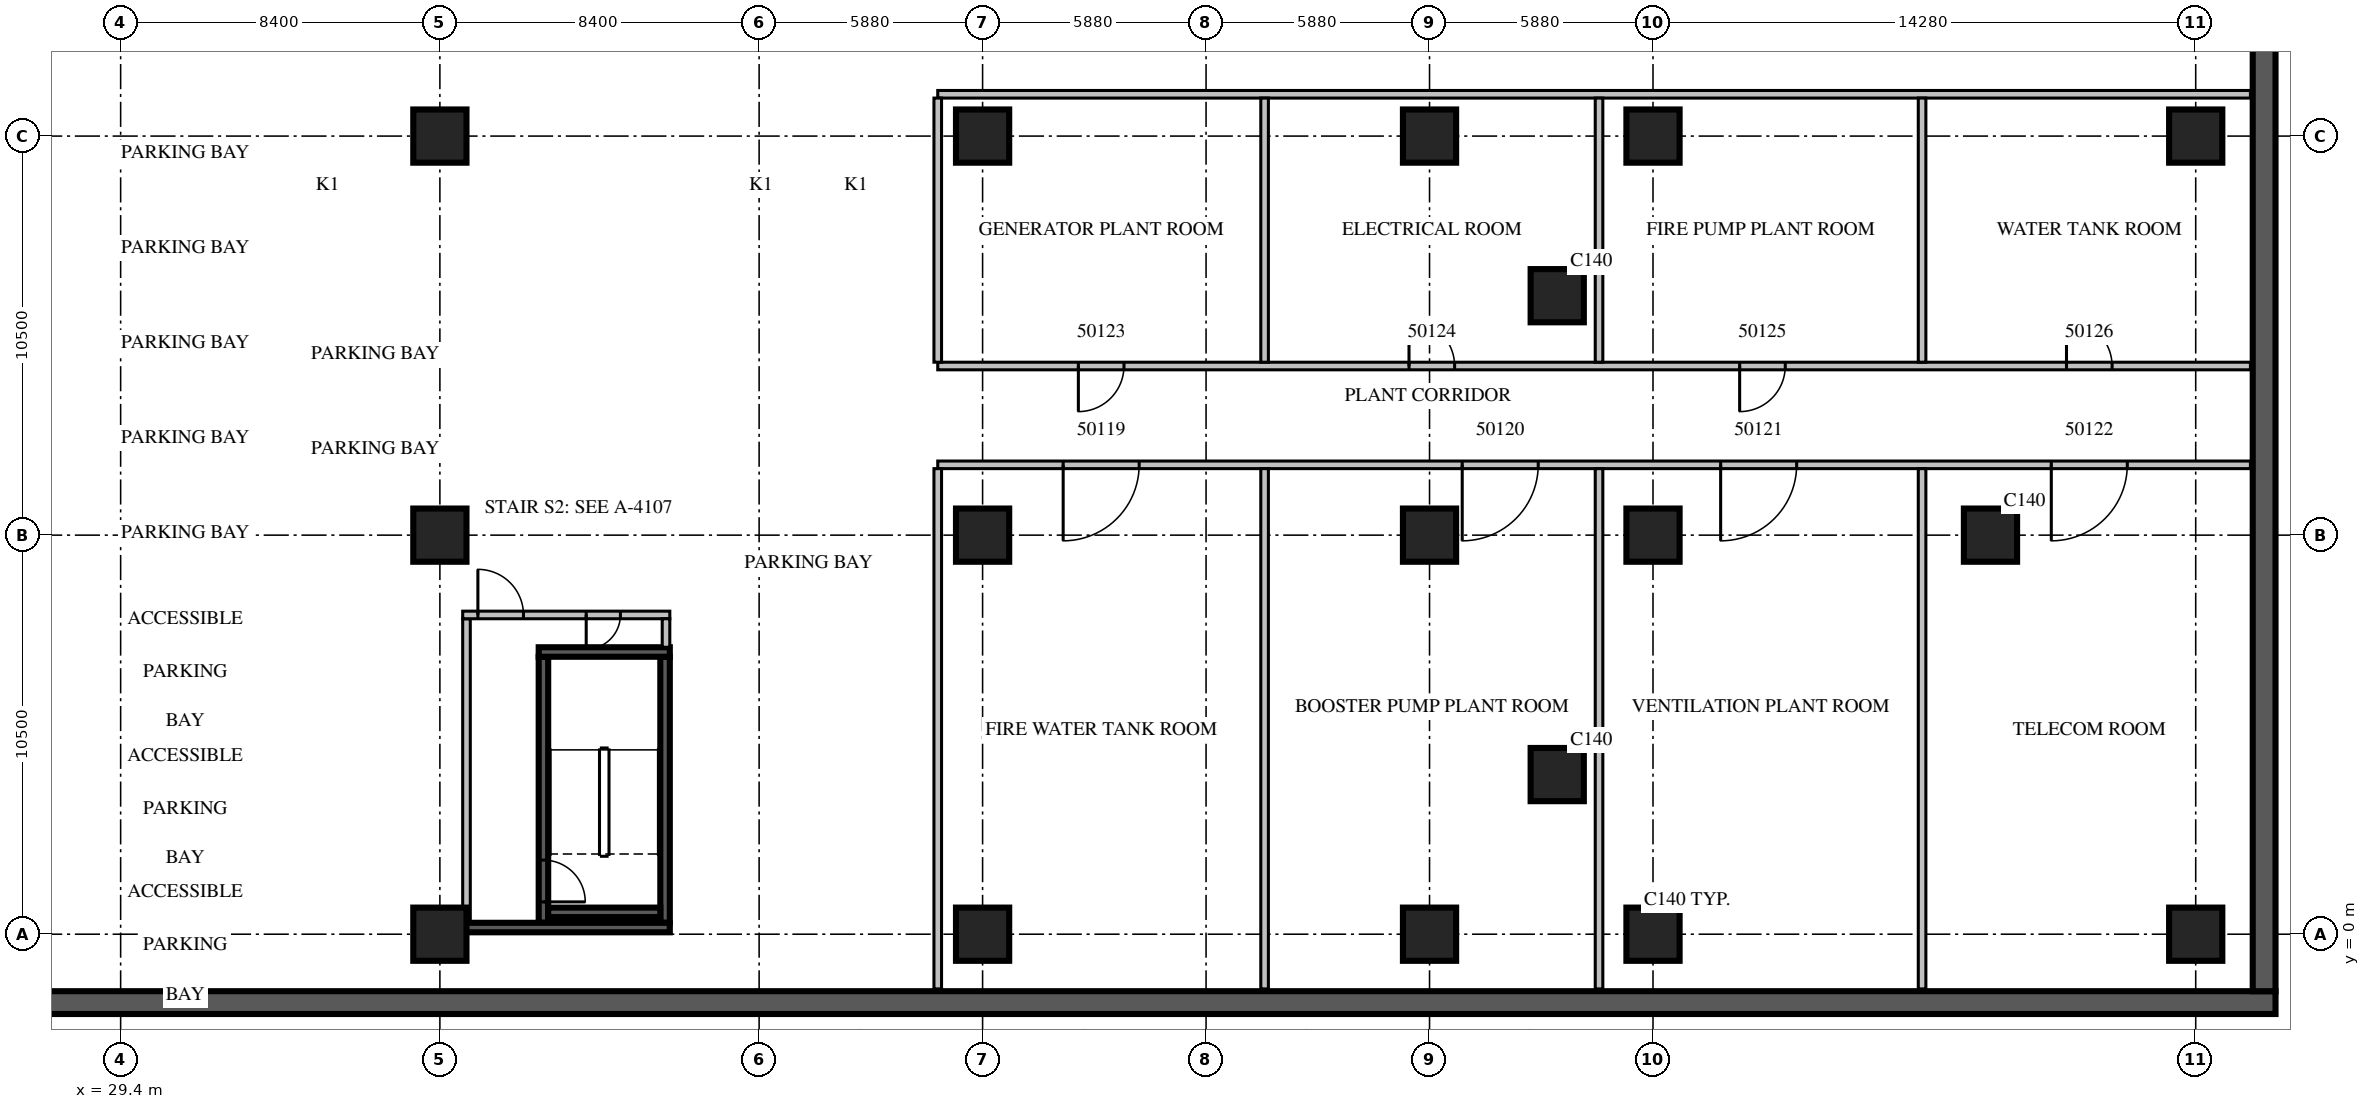
"""IFC4 building model, lengths in metres.
Left out: names, types, materials, properties, quantities, classifications, styles, units other than length and angle.
Written with IfcOpenShell. Run it as: python <this file> out.ifc"""

import sys

from ifc_helpers import new_model, si_unit, direction, frame, frame_2d, origin, origin_2d, place, context, subcontext, project, spatial, rectangle, extrude, source, transform, mapped, element, fill, save


model = new_model("IFC4")
c1 = context("Model", 3, precision=1e-05, world=origin(), true_north=direction((0.0, 1.0)))
c2 = subcontext(c1, "Body", "Model", "MODEL_VIEW")
j1 = project(units=[si_unit("LENGTHUNIT", "METRE"), si_unit("PLANEANGLEUNIT", "RADIAN")], contexts=[c1])
p1 = place(None, origin())
s1 = spatial("IfcSite", under=j1, at=p1, CompositionType="ELEMENT")
p2 = place(p1, origin())
s2 = spatial("IfcBuilding", under=s1, at=p2, CompositionType="ELEMENT")
p3 = place(p2, frame((0.0, 0.0, -9.0)))
s3 = spatial("IfcBuildingStorey", under=s2, at=p3, CompositionType="ELEMENT", Elevation=-9.0)
m1 = source(origin(), c2, "Body", "SweptSolid", [
    extrude(rectangle(XDim=87.6, YDim=0.6, at=frame_2d((43.8, 0.0))), origin(), (0.0, 0.0, 1.0), 4.5),
])
p4 = place(p3, frame((-1.5, -1.8, 0.0), z_axis=(0.0, 0.0, 1.0), x_axis=(1.0, 0.0, 0.0)))
e1 = element("IfcWall", 1, at=p4, inside=s3, PredefinedType="SOLIDWALL", context=c2, shape_type="MappedRepresentation", body=[
    mapped(m1, transform((0.0, 0.0, 0.0), scale=1.0)),
])
m2 = source(origin(), c2, "Body", "SweptSolid", [
    extrude(rectangle(XDim=55.68, YDim=0.6, at=frame_2d((27.84, 0.0))), origin(), (0.0, 0.0, 1.0), 4.5),
])
p5 = place(p3, frame((85.8, -1.5, 0.0), z_axis=(0.0, 0.0, 1.0), x_axis=(0.0, 1.0, 0.0)))
e2 = element("IfcWall", 2, at=p5, inside=s3, PredefinedType="SOLIDWALL", context=c2, shape_type="MappedRepresentation", body=[
    mapped(m2, transform((0.0, 0.0, 0.0), scale=1.0)),
])
m3 = source(origin(), c2, "Body", "SweptSolid", [
    extrude(rectangle(XDim=1.4, YDim=1.4, at=origin_2d()), origin(), (0.0, 0.0, 1.0), 4.5),
])
for number, where, z_axis, x_axis in (
    (3, (37.8, 0.0, 0.0), (0.0, 0.0, 1.0), (1.0, 0.0, 0.0)),
    (4, (37.8, 10.5, 0.0), (0.0, 0.0, 1.0), (1.0, 0.0, 0.0)),
    (5, (37.8, 21.0, 0.0), (0.0, 0.0, 1.0), (1.0, 0.0, 0.0)),
    (6, (52.08, 0.0, 0.0), (0.0, 0.0, 1.0), (1.0, 0.0, 0.0)),
    (7, (52.08, 10.5, 0.0), (0.0, 0.0, 1.0), (1.0, 0.0, 0.0)),
    (8, (52.08, 21.0, 0.0), (0.0, 0.0, 1.0), (1.0, 0.0, 0.0)),
    (9, (63.84, 0.0, 0.0), (0.0, 0.0, 1.0), (1.0, 0.0, 0.0)),
    (10, (63.84, 10.5, 0.0), (0.0, 0.0, 1.0), (1.0, 0.0, 0.0)),
    (11, (63.84, 21.0, 0.0), (0.0, 0.0, 1.0), (1.0, 0.0, 0.0)),
    (12, (67.2, 4.2, 0.0), (0.0, 0.0, 1.0), (1.0, 0.0, 0.0)),
    (13, (67.2, 16.8, 0.0), (0.0, 0.0, 1.0), (1.0, 0.0, 0.0)),
    (14, (69.72, 0.0, 0.0), (0.0, 0.0, 1.0), (1.0, 0.0, 0.0)),
    (15, (69.72, 10.5, 0.0), (0.0, 0.0, 1.0), (1.0, 0.0, 0.0)),
    (16, (69.72, 21.0, 0.0), (0.0, 0.0, 1.0), (1.0, 0.0, 0.0)),
    (17, (78.6, 10.5, 0.0), (0.0, 0.0, 1.0), (1.0, 0.0, 0.0)),
    (18, (84.0, 0.0, 0.0), (0.0, 0.0, 1.0), (1.0, 0.0, 0.0)),
    (19, (84.0, 21.0, 0.0), (0.0, 0.0, 1.0), (1.0, 0.0, 0.0)),
):
    element("IfcColumn", number, at=place(p3, frame(where, z_axis=z_axis, x_axis=x_axis)), inside=s3, PredefinedType="COLUMN", context=c2, shape_type="MappedRepresentation", body=[
        mapped(m3, transform((0.0, 0.0, 0.0), scale=1.0)),
    ])
m4 = source(origin(), c2, "Body", "SweptSolid", [
    extrude(rectangle(XDim=7.0, YDim=0.25, at=frame_2d((3.5, 0.0))), origin(), (0.0, 0.0, 1.0), 3.9),
])
p6 = place(p3, frame((40.525, 0.3, 0.0), z_axis=(0.0, 0.0, 1.0), x_axis=(0.0, 1.0, 0.0)))
e20 = element("IfcWall", 20, at=p6, inside=s3, PredefinedType="SOLIDWALL", context=c2, shape_type="MappedRepresentation", body=[
    mapped(m4, transform((0.0, 0.0, 0.0), scale=1.0)),
])
m5 = source(origin(), c2, "Body", "SweptSolid", [
    extrude(rectangle(XDim=1.1, YDim=2.1, at=frame_2d((0.55, 1.05))), frame((0.0, 0.135, 0.0), z_axis=(0.0, -1.0, 0.0), x_axis=(1.0, 0.0, 0.0)), (0.0, 0.0, 1.0), 0.27),
])
p7 = place(p6, frame((0.55, 0.0, 0.0)))
e21 = element("IfcOpeningElement", 21, at=p7, cuts=e20, PredefinedType="OPENING", context=c2, shape_type="MappedRepresentation", body=[
    mapped(m5, transform((0.0, 0.0, 0.0), scale=1.0)),
])
p8 = place(p3, frame((43.725, 0.3, 0.0), z_axis=(0.0, 0.0, 1.0), x_axis=(0.0, 1.0, 0.0)))
e22 = element("IfcWall", 22, at=p8, inside=s3, PredefinedType="SOLIDWALL", context=c2, shape_type="MappedRepresentation", body=[
    mapped(m4, transform((0.0, 0.0, 0.0), scale=1.0)),
])
m6 = source(origin(), c2, "Body", "SweptSolid", [
    extrude(rectangle(XDim=3.45, YDim=0.25, at=frame_2d((1.725, 0.0))), origin(), (0.0, 0.0, 1.0), 3.9),
])
p9 = place(p3, frame((40.4, 7.425, 0.0), z_axis=(0.0, 0.0, 1.0), x_axis=(1.0, 0.0, 0.0)))
e23 = element("IfcWall", 23, at=p9, inside=s3, PredefinedType="SOLIDWALL", context=c2, shape_type="MappedRepresentation", body=[
    mapped(m6, transform((0.0, 0.0, 0.0), scale=1.0)),
])
m7 = source(origin(), c2, "Body", "SweptSolid", [
    extrude(rectangle(XDim=2.95, YDim=0.25, at=frame_2d((1.475, 0.0))), origin(), (0.0, 0.0, 1.0), 3.9),
])
p10 = place(p3, frame((40.65, 0.575, 0.0), z_axis=(0.0, 0.0, 1.0), x_axis=(1.0, 0.0, 0.0)))
e24 = element("IfcWall", 24, at=p10, inside=s3, PredefinedType="SOLIDWALL", context=c2, shape_type="MappedRepresentation", body=[
    mapped(m7, transform((0.0, 0.0, 0.0), scale=1.0)),
])
m8 = source(origin(), c2, "Body", "SweptSolid", [
    extrude(rectangle(XDim=8.0, YDim=0.2, at=frame_2d((4.0, 0.0))), origin(), (0.0, 0.0, 1.0), 3.9),
])
p11 = place(p3, frame((38.5, 0.3, 0.0), z_axis=(0.0, 0.0, 1.0), x_axis=(0.0, 1.0, 0.0)))
e25 = element("IfcWall", 25, at=p11, inside=s3, PredefinedType="PARTITIONING", context=c2, shape_type="MappedRepresentation", body=[
    mapped(m8, transform((0.0, 0.0, 0.0), scale=1.0)),
])
m9 = source(origin(), c2, "Body", "SweptSolid", [
    extrude(rectangle(XDim=5.45, YDim=0.2, at=frame_2d((2.725, 0.0))), origin(), (0.0, 0.0, 1.0), 3.9),
])
p12 = place(p3, frame((38.4, 8.4, 0.0), z_axis=(0.0, 0.0, 1.0), x_axis=(1.0, 0.0, 0.0)))
e26 = element("IfcWall", 26, at=p12, inside=s3, PredefinedType="PARTITIONING", context=c2, shape_type="MappedRepresentation", body=[
    mapped(m9, transform((0.0, 0.0, 0.0), scale=1.0)),
])
m10 = source(origin(), c2, "Body", "SweptSolid", [
    extrude(rectangle(XDim=1.2, YDim=2.1, at=frame_2d((0.6, 1.05))), frame((0.0, 0.11, 0.0), z_axis=(0.0, -1.0, 0.0), x_axis=(1.0, 0.0, 0.0)), (0.0, 0.0, 1.0), 0.22),
])
p13 = place(p12, frame((0.4, 0.0, 0.0)))
e27 = element("IfcOpeningElement", 27, at=p13, cuts=e26, PredefinedType="OPENING", context=c2, shape_type="MappedRepresentation", body=[
    mapped(m10, transform((0.0, 0.0, 0.0), scale=1.0)),
])
m11 = source(origin(), c2, "Body", "SweptSolid", [
    extrude(rectangle(XDim=0.9, YDim=2.1, at=frame_2d((0.45, 1.05))), frame((0.0, 0.11, 0.0), z_axis=(0.0, -1.0, 0.0), x_axis=(1.0, 0.0, 0.0)), (0.0, 0.0, 1.0), 0.22),
])
p14 = place(p12, frame((3.25, 0.0, 0.0)))
e28 = element("IfcOpeningElement", 28, at=p14, cuts=e26, PredefinedType="OPENING", context=c2, shape_type="MappedRepresentation", body=[
    mapped(m11, transform((0.0, 0.0, 0.0), scale=1.0)),
])
m12 = source(origin(), c2, "Body", "SweptSolid", [
    extrude(rectangle(XDim=0.75, YDim=0.2, at=frame_2d((0.375, 0.0))), origin(), (0.0, 0.0, 1.0), 3.9),
])
p15 = place(p3, frame((43.75, 7.55, 0.0), z_axis=(0.0, 0.0, 1.0), x_axis=(0.0, 1.0, 0.0)))
e29 = element("IfcWall", 29, at=p15, inside=s3, PredefinedType="PARTITIONING", context=c2, shape_type="MappedRepresentation", body=[
    mapped(m12, transform((0.0, 0.0, 0.0), scale=1.0)),
])
m13 = source(origin(), c2, "Body", "SweptSolid", [
    extrude(rectangle(XDim=5.45, YDim=0.25, at=frame_2d((2.725, 0.0))), origin(), (0.0, 0.0, 1.0), 3.9),
])
p16 = place(p3, frame((38.4, 0.175, 0.0), z_axis=(0.0, 0.0, 1.0), x_axis=(1.0, 0.0, 0.0)))
e30 = element("IfcWall", 30, at=p16, inside=s3, PredefinedType="SOLIDWALL", context=c2, shape_type="MappedRepresentation", body=[
    mapped(m13, transform((0.0, 0.0, 0.0), scale=1.0)),
])
m14 = source(origin(), c2, "Body", "SweptSolid", [
    extrude(rectangle(XDim=34.54, YDim=0.2, at=frame_2d((17.27, 0.0))), origin(), (0.0, 0.0, 1.0), 3.9),
])
p17 = place(p3, frame((50.9, 12.35, 0.0), z_axis=(0.0, 0.0, 1.0), x_axis=(1.0, 0.0, 0.0)))
e31 = element("IfcWall", 31, at=p17, inside=s3, PredefinedType="PARTITIONING", context=c2, shape_type="MappedRepresentation", body=[
    mapped(m14, transform((0.0, 0.0, 0.0), scale=1.0)),
])
m15 = source(origin(), c2, "Body", "SweptSolid", [
    extrude(rectangle(XDim=2.0, YDim=2.1, at=frame_2d((1.0, 1.05))), frame((0.0, 0.11, 0.0), z_axis=(0.0, -1.0, 0.0), x_axis=(1.0, 0.0, 0.0)), (0.0, 0.0, 1.0), 0.22),
])
p18 = place(p17, frame((3.3, 0.0, 0.0)))
e32 = element("IfcOpeningElement", 32, at=p18, cuts=e31, PredefinedType="OPENING", context=c2, shape_type="MappedRepresentation", body=[
    mapped(m15, transform((0.0, 0.0, 0.0), scale=1.0)),
])
p19 = place(p17, frame((13.8, 0.0, 0.0)))
e33 = element("IfcOpeningElement", 33, at=p19, cuts=e31, PredefinedType="OPENING", context=c2, shape_type="MappedRepresentation", body=[
    mapped(m15, transform((0.0, 0.0, 0.0), scale=1.0)),
])
p20 = place(p17, frame((20.6, 0.0, 0.0)))
e34 = element("IfcOpeningElement", 34, at=p20, cuts=e31, PredefinedType="OPENING", context=c2, shape_type="MappedRepresentation", body=[
    mapped(m15, transform((0.0, 0.0, 0.0), scale=1.0)),
])
p21 = place(p17, frame((29.3, 0.0, 0.0)))
e35 = element("IfcOpeningElement", 35, at=p21, cuts=e31, PredefinedType="OPENING", context=c2, shape_type="MappedRepresentation", body=[
    mapped(m15, transform((0.0, 0.0, 0.0), scale=1.0)),
])
p22 = place(p3, frame((50.9, 14.95, 0.0), z_axis=(0.0, 0.0, 1.0), x_axis=(1.0, 0.0, 0.0)))
e36 = element("IfcWall", 36, at=p22, inside=s3, PredefinedType="PARTITIONING", context=c2, shape_type="MappedRepresentation", body=[
    mapped(m14, transform((0.0, 0.0, 0.0), scale=1.0)),
])
p23 = place(p22, frame((3.7, 0.0, 0.0)))
e37 = element("IfcOpeningElement", 37, at=p23, cuts=e36, PredefinedType="OPENING", context=c2, shape_type="MappedRepresentation", body=[
    mapped(m10, transform((0.0, 0.0, 0.0), scale=1.0)),
])
p24 = place(p22, frame((12.4, 0.0, 0.0)))
e38 = element("IfcOpeningElement", 38, at=p24, cuts=e36, PredefinedType="OPENING", context=c2, shape_type="MappedRepresentation", body=[
    mapped(m10, transform((0.0, 0.0, 0.0), scale=1.0)),
])
p25 = place(p22, frame((21.1, 0.0, 0.0)))
e39 = element("IfcOpeningElement", 39, at=p25, cuts=e36, PredefinedType="OPENING", context=c2, shape_type="MappedRepresentation", body=[
    mapped(m10, transform((0.0, 0.0, 0.0), scale=1.0)),
])
p26 = place(p22, frame((29.7, 0.0, 0.0)))
e40 = element("IfcOpeningElement", 40, at=p26, cuts=e36, PredefinedType="OPENING", context=c2, shape_type="MappedRepresentation", body=[
    mapped(m10, transform((0.0, 0.0, 0.0), scale=1.0)),
])
p27 = place(p3, frame((50.9, 22.1, 0.0), z_axis=(0.0, 0.0, 1.0), x_axis=(1.0, 0.0, 0.0)))
e41 = element("IfcWall", 41, at=p27, inside=s3, PredefinedType="PARTITIONING", context=c2, shape_type="MappedRepresentation", body=[
    mapped(m14, transform((0.0, 0.0, 0.0), scale=1.0)),
])
m16 = source(origin(), c2, "Body", "SweptSolid", [
    extrude(rectangle(XDim=13.69, YDim=0.2, at=frame_2d((6.845, 0.0))), origin(), (0.0, 0.0, 1.0), 3.9),
])
p28 = place(p3, frame((50.9, -1.44, 0.0), z_axis=(0.0, 0.0, 1.0), x_axis=(0.0, 1.0, 0.0)))
e42 = element("IfcWall", 42, at=p28, inside=s3, PredefinedType="PARTITIONING", context=c2, shape_type="MappedRepresentation", body=[
    mapped(m16, transform((0.0, 0.0, 0.0), scale=1.0)),
])
m17 = source(origin(), c2, "Body", "SweptSolid", [
    extrude(rectangle(XDim=6.95, YDim=0.2, at=frame_2d((3.475, 0.0))), origin(), (0.0, 0.0, 1.0), 3.9),
])
p29 = place(p3, frame((50.9, 15.05, 0.0), z_axis=(0.0, 0.0, 1.0), x_axis=(0.0, 1.0, 0.0)))
e43 = element("IfcWall", 43, at=p29, inside=s3, PredefinedType="PARTITIONING", context=c2, shape_type="MappedRepresentation", body=[
    mapped(m17, transform((0.0, 0.0, 0.0), scale=1.0)),
])
p30 = place(p3, frame((59.5, -1.44, 0.0), z_axis=(0.0, 0.0, 1.0), x_axis=(0.0, 1.0, 0.0)))
e44 = element("IfcWall", 44, at=p30, inside=s3, PredefinedType="PARTITIONING", context=c2, shape_type="MappedRepresentation", body=[
    mapped(m16, transform((0.0, 0.0, 0.0), scale=1.0)),
])
p31 = place(p3, frame((59.5, 15.05, 0.0), z_axis=(0.0, 0.0, 1.0), x_axis=(0.0, 1.0, 0.0)))
e45 = element("IfcWall", 45, at=p31, inside=s3, PredefinedType="PARTITIONING", context=c2, shape_type="MappedRepresentation", body=[
    mapped(m17, transform((0.0, 0.0, 0.0), scale=1.0)),
])
p32 = place(p3, frame((68.3, -1.44, 0.0), z_axis=(0.0, 0.0, 1.0), x_axis=(0.0, 1.0, 0.0)))
e46 = element("IfcWall", 46, at=p32, inside=s3, PredefinedType="PARTITIONING", context=c2, shape_type="MappedRepresentation", body=[
    mapped(m16, transform((0.0, 0.0, 0.0), scale=1.0)),
])
p33 = place(p3, frame((68.3, 15.05, 0.0), z_axis=(0.0, 0.0, 1.0), x_axis=(0.0, 1.0, 0.0)))
e47 = element("IfcWall", 47, at=p33, inside=s3, PredefinedType="PARTITIONING", context=c2, shape_type="MappedRepresentation", body=[
    mapped(m17, transform((0.0, 0.0, 0.0), scale=1.0)),
])
p34 = place(p3, frame((76.8, -1.44, 0.0), z_axis=(0.0, 0.0, 1.0), x_axis=(0.0, 1.0, 0.0)))
e48 = element("IfcWall", 48, at=p34, inside=s3, PredefinedType="PARTITIONING", context=c2, shape_type="MappedRepresentation", body=[
    mapped(m16, transform((0.0, 0.0, 0.0), scale=1.0)),
])
p35 = place(p3, frame((76.8, 15.05, 0.0), z_axis=(0.0, 0.0, 1.0), x_axis=(0.0, 1.0, 0.0)))
e49 = element("IfcWall", 49, at=p35, inside=s3, PredefinedType="PARTITIONING", context=c2, shape_type="MappedRepresentation", body=[
    mapped(m17, transform((0.0, 0.0, 0.0), scale=1.0)),
])
m18 = source(origin(), c2, "Body", "SweptSolid", [
    extrude(rectangle(XDim=1.1, YDim=2.1, at=frame_2d((0.55, 1.05))), frame((0.0, 0.025, 0.0), z_axis=(0.0, -1.0, 0.0), x_axis=(1.0, 0.0, 0.0)), (0.0, 0.0, 1.0), 0.05),
])
p36 = place(p7, origin())
e50 = element("IfcDoor", 50, at=p36, inside=s3, OperationType="SINGLE_SWING_RIGHT", PredefinedType="DOOR", context=c2, shape_type="MappedRepresentation", body=[
    mapped(m18, transform((0.0, 0.0, 0.0), scale=1.0)),
])
fill(e21, e50)
m19 = source(origin(), c2, "Body", "SweptSolid", [
    extrude(rectangle(XDim=1.2, YDim=2.1, at=frame_2d((0.6, 1.05))), frame((0.0, 0.025, 0.0), z_axis=(0.0, -1.0, 0.0), x_axis=(1.0, 0.0, 0.0)), (0.0, 0.0, 1.0), 0.05),
])
p37 = place(p13, origin())
e51 = element("IfcDoor", 51, at=p37, inside=s3, OperationType="SINGLE_SWING_LEFT", PredefinedType="DOOR", context=c2, shape_type="MappedRepresentation", body=[
    mapped(m19, transform((0.0, 0.0, 0.0), scale=1.0)),
])
fill(e27, e51)
m20 = source(origin(), c2, "Body", "SweptSolid", [
    extrude(rectangle(XDim=0.9, YDim=2.1, at=frame_2d((0.45, 1.05))), frame((0.0, 0.025, 0.0), z_axis=(0.0, -1.0, 0.0), x_axis=(1.0, 0.0, 0.0)), (0.0, 0.0, 1.0), 0.05),
])
p38 = place(p14, origin())
e52 = element("IfcDoor", 52, at=p38, inside=s3, OperationType="SINGLE_SWING_RIGHT", PredefinedType="DOOR", context=c2, shape_type="MappedRepresentation", body=[
    mapped(m20, transform((0.0, 0.0, 0.0), scale=1.0)),
])
fill(e28, e52)
m21 = source(origin(), c2, "Body", "SweptSolid", [
    extrude(rectangle(XDim=2.0, YDim=2.1, at=frame_2d((1.0, 1.05))), frame((0.0, 0.025, 0.0), z_axis=(0.0, -1.0, 0.0), x_axis=(1.0, 0.0, 0.0)), (0.0, 0.0, 1.0), 0.05),
])
p39 = place(p18, origin())
e53 = element("IfcDoor", 53, at=p39, inside=s3, OperationType="DOUBLE_DOOR_SINGLE_SWING", PredefinedType="DOOR", context=c2, shape_type="MappedRepresentation", body=[
    mapped(m21, transform((0.0, 0.0, 0.0), scale=1.0)),
])
fill(e32, e53)
p40 = place(p19, origin())
e54 = element("IfcDoor", 54, at=p40, inside=s3, OperationType="DOUBLE_DOOR_SINGLE_SWING", PredefinedType="DOOR", context=c2, shape_type="MappedRepresentation", body=[
    mapped(m21, transform((0.0, 0.0, 0.0), scale=1.0)),
])
fill(e33, e54)
p41 = place(p20, origin())
e55 = element("IfcDoor", 55, at=p41, inside=s3, OperationType="DOUBLE_DOOR_SINGLE_SWING", PredefinedType="DOOR", context=c2, shape_type="MappedRepresentation", body=[
    mapped(m21, transform((0.0, 0.0, 0.0), scale=1.0)),
])
fill(e34, e55)
p42 = place(p21, origin())
e56 = element("IfcDoor", 56, at=p42, inside=s3, OperationType="DOUBLE_DOOR_SINGLE_SWING", PredefinedType="DOOR", context=c2, shape_type="MappedRepresentation", body=[
    mapped(m21, transform((0.0, 0.0, 0.0), scale=1.0)),
])
fill(e35, e56)
p43 = place(p23, origin())
e57 = element("IfcDoor", 57, at=p43, inside=s3, OperationType="SINGLE_SWING_RIGHT", PredefinedType="DOOR", context=c2, shape_type="MappedRepresentation", body=[
    mapped(m19, transform((0.0, 0.0, 0.0), scale=1.0)),
])
fill(e37, e57)
p44 = place(p24, origin())
e58 = element("IfcDoor", 58, at=p44, inside=s3, OperationType="SINGLE_SWING_LEFT", PredefinedType="DOOR", context=c2, shape_type="MappedRepresentation", body=[
    mapped(m19, transform((0.0, 0.0, 0.0), scale=1.0)),
])
fill(e38, e58)
p45 = place(p25, origin())
e59 = element("IfcDoor", 59, at=p45, inside=s3, OperationType="SINGLE_SWING_RIGHT", PredefinedType="DOOR", context=c2, shape_type="MappedRepresentation", body=[
    mapped(m19, transform((0.0, 0.0, 0.0), scale=1.0)),
])
fill(e39, e59)
p46 = place(p26, origin())
e60 = element("IfcDoor", 60, at=p46, inside=s3, OperationType="SINGLE_SWING_LEFT", PredefinedType="DOOR", context=c2, shape_type="MappedRepresentation", body=[
    mapped(m19, transform((0.0, 0.0, 0.0), scale=1.0)),
])
fill(e40, e60)
save(model, sys.argv[1])
